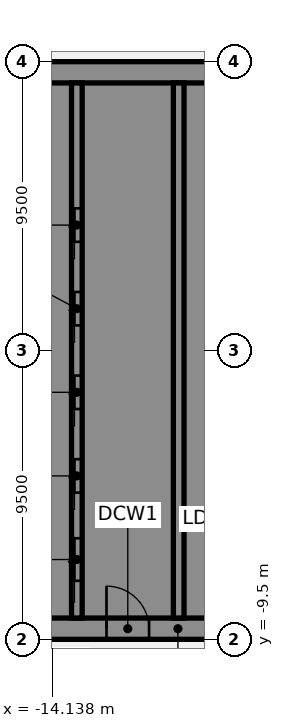
"""IFC4 building model, lengths in metres.
Left out: names, types, materials, properties, quantities, classifications, styles, units other than length and angle.
Written with IfcOpenShell. Run it as: python <this file> out.ifc"""

import sys

from ifc_helpers import new_model, si_unit, direction, frame, frame_2d, origin, place, context, subcontext, project, spatial, polyline, rectangle, outline, extrude, element, fill, save


model = new_model("IFC4")
c1 = context("Model", 3, precision=1e-05, world=origin(), true_north=direction((0.0, 1.0)))
c2 = subcontext(c1, "Body", "Model", "MODEL_VIEW")
j1 = project(units=[si_unit("LENGTHUNIT", "METRE"), si_unit("PLANEANGLEUNIT", "RADIAN")], contexts=[c1])
p1 = place(None, origin())
s1 = spatial("IfcSite", under=j1, at=p1, CompositionType="ELEMENT")
p2 = place(p1, origin())
s2 = spatial("IfcBuilding", under=s1, at=p2, CompositionType="ELEMENT")
p3 = place(p2, frame((0.0, 0.0, 49.0)))
s3 = spatial("IfcBuildingStorey", under=s2, at=p3, CompositionType="ELEMENT", Elevation=49.0)
p4 = place(p3, frame((-16.5, -9.15, 0.0), z_axis=(0.0, 0.0, 1.0), x_axis=(1.0, 0.0, 0.0)))
e1 = element("IfcWall", 1, at=p4, inside=s3, PredefinedType="SHEAR", context=c2, shape_type="SweptSolid", body=[
    extrude(rectangle(XDim=13.0, YDim=0.7, at=frame_2d((6.5, 0.0))), origin(), (0.0, 0.0, 1.0), 3.61),
])
p5 = place(p4, frame((4.15, 0.0, 0.0)))
e2 = element("IfcOpeningElement", 2, at=p5, cuts=e1, PredefinedType="OPENING", context=c2, shape_type="SweptSolid", body=[
    extrude(rectangle(XDim=1.4, YDim=2.1, at=frame_2d((0.7, 1.05))), frame((0.0, 0.36, 0.0), z_axis=(0.0, -1.0, 0.0), x_axis=(1.0, 0.0, 0.0)), (0.0, 0.0, 1.0), 0.72),
])
p6 = place(p4, frame((10.125, 0.0, 0.0)))
e3 = element("IfcOpeningElement", 3, at=p6, cuts=e1, PredefinedType="OPENING", context=c2, shape_type="SweptSolid", body=[
    extrude(rectangle(XDim=1.4, YDim=2.1, at=frame_2d((0.7, 1.05))), frame((0.0, 0.36, 0.0), z_axis=(0.0, -1.0, 0.0), x_axis=(1.0, 0.0, 0.0)), (0.0, 0.0, 1.0), 0.72),
])
p7 = place(p3, origin())
e4 = element("IfcWall", 4, at=p7, inside=s3, PredefinedType="SHEAR", context=c2, shape_type="SweptSolid", body=[
    extrude(outline(polyline([(-13.5, -8.8), (-13.5, -8.125), (-15.8, -8.125), (-15.8, -5.625), (-13.5, -5.625), (-13.5, -5.375), (-15.8, -5.375), (-15.8, -2.875), (-13.5, -2.875), (-13.5, -2.625), (-15.8, -2.625), (-15.8, -0.125), (-13.5, -0.125), (-13.5, 0.125), (-15.8, 0.125), (-15.8, 2.625), (-13.5, 2.625), (-13.5, 2.875), (-15.8, 2.875), (-15.8, 5.375), (-13.5, 5.375), (-13.5, 5.625), (-15.8, 5.625), (-15.8, 8.125), (-13.5, 8.125), (-13.5, 8.8), (-15.8, 8.8), (-16.5, 8.8), (-16.5, -8.8), (-15.8, -8.8), (-13.5, -8.8)])), origin(), (0.0, 0.0, 1.0), 3.61),
])
p8 = place(p3, frame((-16.5, 9.15, 0.0), z_axis=(0.0, 0.0, 1.0), x_axis=(1.0, 0.0, 0.0)))
e5 = element("IfcWall", 5, at=p8, inside=s3, PredefinedType="SHEAR", context=c2, shape_type="SweptSolid", body=[
    extrude(rectangle(XDim=13.0, YDim=0.7, at=frame_2d((6.5, 0.0))), origin(), (0.0, 0.0, 1.0), 3.61),
])
p9 = place(p3, origin())
e6 = element("IfcWall", 6, at=p9, inside=s3, PredefinedType="SHEAR", context=c2, shape_type="SweptSolid", body=[
    extrude(outline(polyline([(-9.8, -5.375), (-9.8, -5.625), (-7.5, -5.625), (-7.15, -5.625), (-7.15, 8.8), (-7.5, 8.8), (-9.8, 8.8), (-9.8, 8.125), (-7.5, 8.125), (-7.5, 5.625), (-9.8, 5.625), (-9.8, 5.375), (-7.5, 5.375), (-7.5, 2.875), (-9.8, 2.875), (-9.8, 2.625), (-7.5, 2.625), (-7.5, 0.125), (-9.8, 0.125), (-9.8, -0.125), (-7.5, -0.125), (-7.5, -2.625), (-9.8, -2.625), (-9.8, -2.875), (-7.5, -2.875), (-7.5, -5.375), (-9.8, -5.375)])), origin(), (0.0, 0.0, 1.0), 3.61),
])
p10 = place(p3, origin())
e7 = element("IfcWall", 7, at=p10, inside=s3, PredefinedType="SHEAR", context=c2, shape_type="SweptSolid", body=[
    extrude(outline(polyline([(-7.5, -8.125), (-9.55, -8.125), (-9.55, -5.625), (-9.8, -5.625), (-9.8, -8.125), (-9.8, -8.8), (-7.5, -8.8), (-7.5, -8.125)])), origin(), (0.0, 0.0, 1.0), 3.61),
])
p11 = place(p3, frame((-13.325, -8.8, 0.0), z_axis=(0.0, 0.0, 1.0), x_axis=(0.0, 1.0, 0.0)))
e8 = element("IfcWall", 8, at=p11, inside=s3, PredefinedType="SHEAR", context=c2, shape_type="SweptSolid", body=[
    extrude(rectangle(XDim=17.6, YDim=0.35, at=frame_2d((8.8, 0.0))), origin(), (0.0, 0.0, 1.0), 3.61),
])
p12 = place(p11, frame((1.225, 0.0, 0.0)))
e9 = element("IfcOpeningElement", 9, at=p12, cuts=e8, PredefinedType="OPENING", context=c2, shape_type="SweptSolid", body=[
    extrude(rectangle(XDim=1.4, YDim=2.1, at=frame_2d((0.7, 1.05))), frame((0.0, 0.185, 0.0), z_axis=(0.0, -1.0, 0.0), x_axis=(1.0, 0.0, 0.0)), (0.0, 0.0, 1.0), 0.37),
])
p13 = place(p11, frame((4.125, 0.0, 0.0)))
e10 = element("IfcOpeningElement", 10, at=p13, cuts=e8, PredefinedType="OPENING", context=c2, shape_type="SweptSolid", body=[
    extrude(rectangle(XDim=1.1, YDim=2.1, at=frame_2d((0.55, 1.05))), frame((0.0, 0.185, 0.0), z_axis=(0.0, -1.0, 0.0), x_axis=(1.0, 0.0, 0.0)), (0.0, 0.0, 1.0), 0.37),
])
p14 = place(p11, frame((6.875, 0.0, 0.0)))
e11 = element("IfcOpeningElement", 11, at=p14, cuts=e8, PredefinedType="OPENING", context=c2, shape_type="SweptSolid", body=[
    extrude(rectangle(XDim=1.1, YDim=2.1, at=frame_2d((0.55, 1.05))), frame((0.0, 0.185, 0.0), z_axis=(0.0, -1.0, 0.0), x_axis=(1.0, 0.0, 0.0)), (0.0, 0.0, 1.0), 0.37),
])
p15 = place(p11, frame((9.625, 0.0, 0.0)))
e12 = element("IfcOpeningElement", 12, at=p15, cuts=e8, PredefinedType="OPENING", context=c2, shape_type="SweptSolid", body=[
    extrude(rectangle(XDim=1.1, YDim=2.1, at=frame_2d((0.55, 1.05))), frame((0.0, 0.185, 0.0), z_axis=(0.0, -1.0, 0.0), x_axis=(1.0, 0.0, 0.0)), (0.0, 0.0, 1.0), 0.37),
])
p16 = place(p11, frame((12.375, 0.0, 0.0)))
e13 = element("IfcOpeningElement", 13, at=p16, cuts=e8, PredefinedType="OPENING", context=c2, shape_type="SweptSolid", body=[
    extrude(rectangle(XDim=1.1, YDim=2.1, at=frame_2d((0.55, 1.05))), frame((0.0, 0.185, 0.0), z_axis=(0.0, -1.0, 0.0), x_axis=(1.0, 0.0, 0.0)), (0.0, 0.0, 1.0), 0.37),
])
p17 = place(p3, frame((-9.975, -8.8, 0.0), z_axis=(0.0, 0.0, 1.0), x_axis=(0.0, 1.0, 0.0)))
e14 = element("IfcWall", 14, at=p17, inside=s3, PredefinedType="SHEAR", context=c2, shape_type="SweptSolid", body=[
    extrude(rectangle(XDim=17.6, YDim=0.35, at=frame_2d((8.8, 0.0))), origin(), (0.0, 0.0, 1.0), 3.61),
])
p18 = place(p5, origin())
e15 = element("IfcDoor", 15, at=p18, inside=s3, OperationType="SINGLE_SWING_LEFT", PredefinedType="DOOR", context=c2, shape_type="SweptSolid", body=[
    extrude(rectangle(XDim=1.4, YDim=2.1, at=frame_2d((0.7, 1.05))), frame((0.0, 0.025, 0.0), z_axis=(0.0, -1.0, 0.0), x_axis=(1.0, 0.0, 0.0)), (0.0, 0.0, 1.0), 0.05),
])
fill(e2, e15)
p19 = place(p12, origin())
e16 = element("IfcDoor", 16, at=p19, inside=s3, OperationType="SLIDING_TO_LEFT", PredefinedType="DOOR", context=c2, shape_type="SweptSolid", body=[
    extrude(rectangle(XDim=1.4, YDim=2.1, at=frame_2d((0.7, 1.05))), frame((0.0, 0.025, 0.0), z_axis=(0.0, -1.0, 0.0), x_axis=(1.0, 0.0, 0.0)), (0.0, 0.0, 1.0), 0.05),
])
fill(e9, e16)
p20 = place(p13, origin())
e17 = element("IfcDoor", 17, at=p20, inside=s3, OperationType="SLIDING_TO_LEFT", PredefinedType="DOOR", context=c2, shape_type="SweptSolid", body=[
    extrude(rectangle(XDim=1.1, YDim=2.1, at=frame_2d((0.55, 1.05))), frame((0.0, 0.025, 0.0), z_axis=(0.0, -1.0, 0.0), x_axis=(1.0, 0.0, 0.0)), (0.0, 0.0, 1.0), 0.05),
])
fill(e10, e17)
p21 = place(p14, origin())
e18 = element("IfcDoor", 18, at=p21, inside=s3, OperationType="SLIDING_TO_LEFT", PredefinedType="DOOR", context=c2, shape_type="SweptSolid", body=[
    extrude(rectangle(XDim=1.1, YDim=2.1, at=frame_2d((0.55, 1.05))), frame((0.0, 0.025, 0.0), z_axis=(0.0, -1.0, 0.0), x_axis=(1.0, 0.0, 0.0)), (0.0, 0.0, 1.0), 0.05),
])
fill(e11, e18)
p22 = place(p15, origin())
e19 = element("IfcDoor", 19, at=p22, inside=s3, OperationType="SLIDING_TO_LEFT", PredefinedType="DOOR", context=c2, shape_type="SweptSolid", body=[
    extrude(rectangle(XDim=1.1, YDim=2.1, at=frame_2d((0.55, 1.05))), frame((0.0, 0.025, 0.0), z_axis=(0.0, -1.0, 0.0), x_axis=(1.0, 0.0, 0.0)), (0.0, 0.0, 1.0), 0.05),
])
fill(e12, e19)
p23 = place(p16, origin())
e20 = element("IfcDoor", 20, at=p23, inside=s3, OperationType="SLIDING_TO_LEFT", PredefinedType="DOOR", context=c2, shape_type="SweptSolid", body=[
    extrude(rectangle(XDim=1.1, YDim=2.1, at=frame_2d((0.55, 1.05))), frame((0.0, 0.025, 0.0), z_axis=(0.0, -1.0, 0.0), x_axis=(1.0, 0.0, 0.0)), (0.0, 0.0, 1.0), 0.05),
])
fill(e13, e20)
save(model, sys.argv[1])
